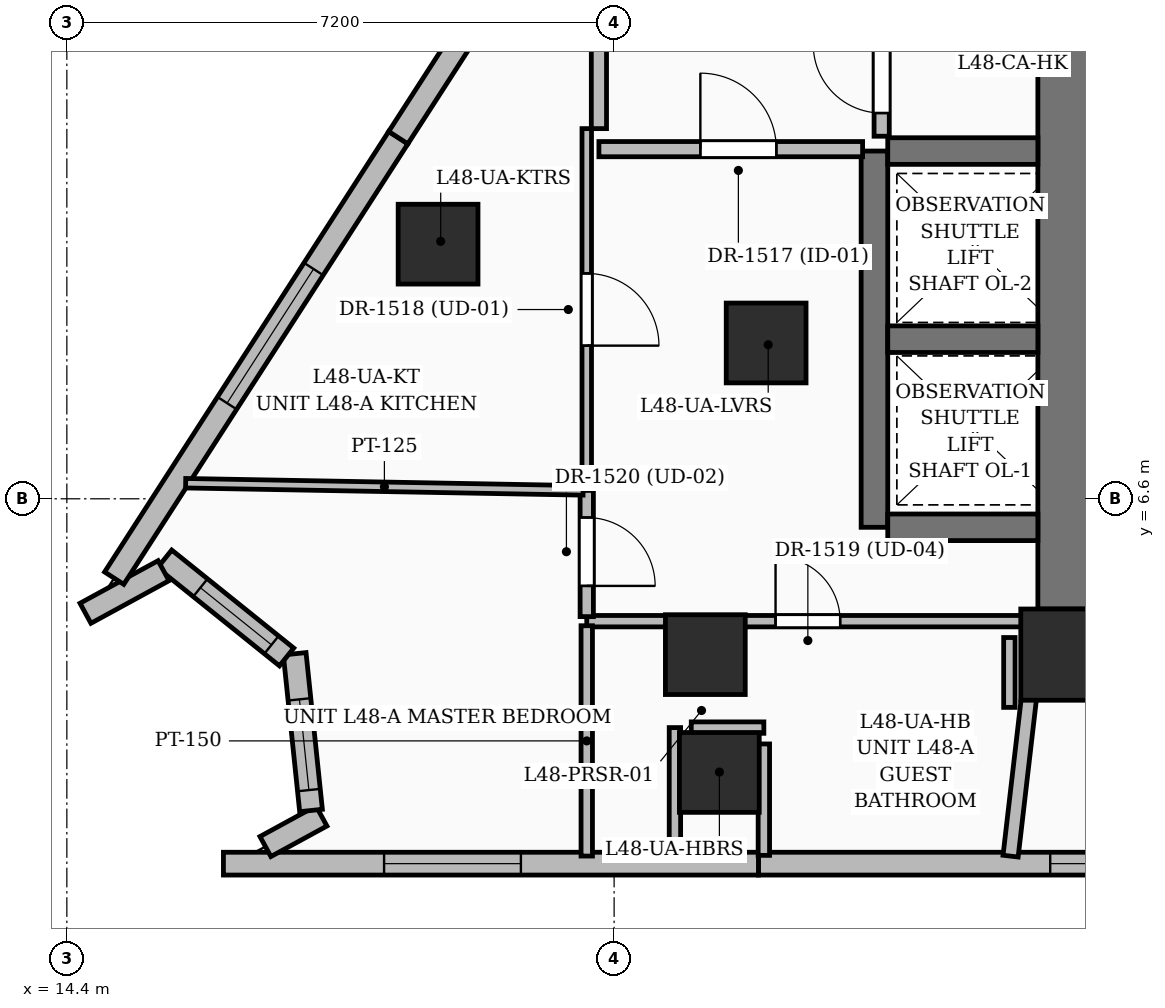
"""IFC4 building model, lengths in metres.
Left out: names, types, materials, properties, quantities, classifications, styles, units other than length and angle.
Written with IfcOpenShell. Run it as: python <this file> out.ifc"""

import sys

from ifc_helpers import new_model, si_unit, direction, frame, frame_2d, origin, origin_2d, place, context, subcontext, project, spatial, rectangle, extrude, element, fill, save


model = new_model("IFC4")
c1 = context("Model", 3, precision=1e-05, world=origin(), true_north=direction((0.0, 1.0)))
c2 = subcontext(c1, "Body", "Model", "MODEL_VIEW")
j1 = project(units=[si_unit("LENGTHUNIT", "METRE"), si_unit("PLANEANGLEUNIT", "RADIAN")], contexts=[c1])
p1 = place(None, origin())
s1 = spatial("IfcSite", under=j1, at=p1, CompositionType="ELEMENT")
p2 = place(p1, origin())
s2 = spatial("IfcBuilding", under=s1, at=p2, CompositionType="ELEMENT")
p3 = place(p2, frame((0.0, 0.0, 186.0)))
s3 = spatial("IfcBuildingStorey", under=s2, at=p3, CompositionType="ELEMENT", Elevation=186.0)
p4 = place(p3, frame((27.55, 4.55, 0.0), z_axis=(0.0, 0.0, 1.0), x_axis=(1.0, 0.0, 0.0)))
e1 = element("IfcColumn", 1, at=p4, inside=s3, PredefinedType="COLUMN", context=c2, shape_type="SweptSolid", body=[
    extrude(rectangle(XDim=1.2, YDim=1.2, at=origin_2d()), origin(), (0.0, 0.0, 1.0), 3.6),
])
for number, where, z_axis, x_axis in (
    (2, (22.8, 4.55, 0.0), (0.0, 0.0, 1.0), (1.0, 0.0, 0.0)),
    (3, (23.6, 8.65, 0.0), (0.0, 0.0, 1.0), (1.0, 0.0, 0.0)),
):
    element("IfcColumn", number, at=place(p3, frame(where, z_axis=z_axis, x_axis=x_axis)), inside=s3, PredefinedType="COLUMN", context=c2, shape_type="SweptSolid", body=[
        extrude(rectangle(XDim=1.05, YDim=1.05, at=origin_2d()), origin(), (0.0, 0.0, 1.0), 3.6),
    ])
p5 = place(p3, frame((27.55, 5.15, 0.0), z_axis=(0.0, 0.0, 1.0), x_axis=(0.0, 1.0, 0.0)))
e4 = element("IfcWall", 4, at=p5, inside=s3, PredefinedType="SHEAR", context=c2, shape_type="SweptSolid", body=[
    extrude(rectangle(XDim=9.0, YDim=0.75, at=frame_2d((4.5, 0.0))), origin(), (0.0, 0.0, 1.0), 3.6),
])
p6 = place(p3, frame((25.025, 6.225, 0.0), z_axis=(0.0, 0.0, 1.0), x_axis=(0.0, 1.0, 0.0)))
e5 = element("IfcWall", 5, at=p6, inside=s3, PredefinedType="SOLIDWALL", context=c2, shape_type="SweptSolid", body=[
    extrude(rectangle(XDim=4.95, YDim=0.35, at=frame_2d((2.475, 0.0))), origin(), (0.0, 0.0, 1.0), 3.6),
])
for number, where, z_axis, x_axis in (
    (6, (25.2, 6.225, 0.0), (0.0, 0.0, 1.0), (1.0, 0.0, 0.0)),
    (7, (25.2, 8.7, 0.0), (0.0, 0.0, 1.0), (1.0, 0.0, 0.0)),
    (8, (25.2, 11.175, 0.0), (0.0, 0.0, 1.0), (1.0, 0.0, 0.0)),
):
    element("IfcWall", number, at=place(p3, frame(where, z_axis=z_axis, x_axis=x_axis)), inside=s3, PredefinedType="SOLIDWALL", context=c2, shape_type="SweptSolid", body=[
        extrude(rectangle(XDim=1.975, YDim=0.35, at=frame_2d((0.988, 0.0))), origin(), (0.0, 0.0, 1.0), 3.6),
    ])
for number, where, z_axis, x_axis in (
    (9, (22.984, 3.0, 0.0), (0.0, 0.0, 1.0), (1.0, 0.0, 0.0)),
    (10, (19.284, 9.95, 0.0), (0.0, 0.0, 1.0), (1.0, 0.0, 0.0)),
):
    element("IfcColumn", number, at=place(p3, frame(where, z_axis=z_axis, x_axis=x_axis)), inside=s3, PredefinedType="COLUMN", context=c2, shape_type="SweptSolid", body=[
        extrude(rectangle(XDim=1.05, YDim=1.05, at=origin_2d()), origin(), (0.0, 0.0, 1.0), 3.6),
    ])
p7 = place(p3, frame((30.537, 1.8, 0.0), z_axis=(0.0, 0.0, 1.0), x_axis=(-1.0, 0.0, 0.0)))
e11 = element("IfcWall", 11, at=p7, inside=s3, PredefinedType="SOLIDWALL", context=c2, shape_type="SweptSolid", body=[
    extrude(rectangle(XDim=7.039, YDim=0.3, at=frame_2d((3.519, 0.0))), origin(), (0.0, 0.0, 1.0), 3.35),
])
p8 = place(p7, frame((1.1, 0.0, 0.55)))
e12 = element("IfcOpeningElement", 12, at=p8, cuts=e11, PredefinedType="OPENING", context=c2, shape_type="SweptSolid", body=[
    extrude(rectangle(XDim=2.1, YDim=2.4, at=frame_2d((1.05, 1.2))), frame((0.0, 0.16, 0.0), z_axis=(0.0, -1.0, 0.0), x_axis=(1.0, 0.0, 0.0)), (0.0, 0.0, 1.0), 0.32),
])
p9 = place(p3, frame((23.499, 1.8, 0.0), z_axis=(0.0, 0.0, 1.0), x_axis=(-1.0, 0.0, 0.0)))
e13 = element("IfcWall", 13, at=p9, inside=s3, PredefinedType="SOLIDWALL", context=c2, shape_type="SweptSolid", body=[
    extrude(rectangle(XDim=7.039, YDim=0.3, at=frame_2d((3.52, 0.0))), origin(), (0.0, 0.0, 1.0), 3.35),
])
p10 = place(p9, frame((3.125, 0.0, 0.6)))
e14 = element("IfcOpeningElement", 14, at=p10, cuts=e13, PredefinedType="OPENING", context=c2, shape_type="SweptSolid", body=[
    extrude(rectangle(XDim=1.8, YDim=2.1, at=frame_2d((0.9, 1.05))), frame((0.0, 0.16, 0.0), z_axis=(0.0, -1.0, 0.0), x_axis=(1.0, 0.0, 0.0)), (0.0, 0.0, 1.0), 0.32),
])
p11 = place(p3, frame((17.013, 2.025, 0.0), z_axis=(0.0, 0.0, 1.0), x_axis=(0.877928900016, 0.478791025936, 0.0)))
e15 = element("IfcWall", 15, at=p11, inside=s3, PredefinedType="SOLIDWALL", context=c2, shape_type="SweptSolid", body=[
    extrude(rectangle(XDim=0.84, YDim=0.3, at=frame_2d((0.42, 0.0))), origin(), (0.0, 0.0, 1.0), 3.35),
])
p12 = place(p3, frame((17.613, 2.499, 0.0), z_axis=(0.0, 0.0, 1.0), x_axis=(-0.10374684954, 0.994603735771, 0.0)))
e16 = element("IfcWall", 16, at=p12, inside=s3, PredefinedType="SOLIDWALL", context=c2, shape_type="SweptSolid", body=[
    extrude(rectangle(XDim=2.073, YDim=0.3, at=frame_2d((1.037, 0.0))), origin(), (0.0, 0.0, 1.0), 3.35),
])
p13 = place(p12, frame((0.27, 0.0, 0.8)))
e17 = element("IfcOpeningElement", 17, at=p13, cuts=e16, PredefinedType="OPENING", context=c2, shape_type="SweptSolid", body=[
    extrude(rectangle(XDim=1.2, YDim=1.8, at=frame_2d((0.6, 0.9))), frame((0.0, 0.16, 0.0), z_axis=(0.0, -1.0, 0.0), x_axis=(1.0, 0.0, 0.0)), (0.0, 0.0, 1.0), 0.32),
])
p14 = place(p3, frame((17.291, 4.519, 0.0), z_axis=(0.0, 0.0, 1.0), x_axis=(-0.779594735896, 0.626284318631, 0.0)))
e18 = element("IfcWall", 18, at=p14, inside=s3, PredefinedType="SOLIDWALL", context=c2, shape_type="SweptSolid", body=[
    extrude(rectangle(XDim=2.059, YDim=0.3, at=frame_2d((1.03, 0.0))), origin(), (0.0, 0.0, 1.0), 3.35),
])
p15 = place(p14, frame((0.255, 0.0, 0.8)))
e19 = element("IfcOpeningElement", 19, at=p15, cuts=e18, PredefinedType="OPENING", context=c2, shape_type="SweptSolid", body=[
    extrude(rectangle(XDim=1.2, YDim=1.8, at=frame_2d((0.6, 0.9))), frame((0.0, 0.16, 0.0), z_axis=(0.0, -1.0, 0.0), x_axis=(1.0, 0.0, 0.0)), (0.0, 0.0, 1.0), 0.32),
])
p16 = place(p3, frame((15.672, 5.654, 0.0), z_axis=(0.0, 0.0, 1.0), x_axis=(-0.877959368473, -0.478735153619, 0.0)))
e20 = element("IfcWall", 20, at=p16, inside=s3, PredefinedType="SOLIDWALL", context=c2, shape_type="SweptSolid", body=[
    extrude(rectangle(XDim=1.17, YDim=0.3, at=frame_2d((0.585, 0.0))), origin(), (0.0, 0.0, 1.0), 3.35),
])
p17 = place(p3, frame((15.023, 5.556, 0.0), z_axis=(0.0, 0.0, 1.0), x_axis=(0.542022034858, 0.840364274424, 0.0)))
e21 = element("IfcWall", 21, at=p17, inside=s3, PredefinedType="SOLIDWALL", context=c2, shape_type="SweptSolid", body=[
    extrude(rectangle(XDim=6.896, YDim=0.3, at=frame_2d((3.448, 0.0))), origin(), (0.0, 0.0, 1.0), 3.35),
])
p18 = place(p17, frame((2.74, 0.0, 0.55)))
e22 = element("IfcOpeningElement", 22, at=p18, cuts=e21, PredefinedType="OPENING", context=c2, shape_type="SweptSolid", body=[
    extrude(rectangle(XDim=2.1, YDim=2.4, at=frame_2d((1.05, 1.2))), frame((0.0, 0.16, 0.0), z_axis=(0.0, -1.0, 0.0), x_axis=(1.0, 0.0, 0.0)), (0.0, 0.0, 1.0), 0.32),
])
p19 = place(p3, frame((18.76, 11.351, 0.0), z_axis=(0.0, 0.0, 1.0), x_axis=(0.542021503454, 0.840364617172, 0.0)))
e23 = element("IfcWall", 23, at=p19, inside=s3, PredefinedType="SOLIDWALL", context=c2, shape_type="SweptSolid", body=[
    extrude(rectangle(XDim=7.231, YDim=0.3, at=frame_2d((3.615, 0.0))), origin(), (0.0, 0.0, 1.0), 3.35),
])
p20 = place(p19, frame((4.5, 0.0, 0.6)))
e24 = element("IfcOpeningElement", 24, at=p20, cuts=e23, PredefinedType="OPENING", context=c2, shape_type="SweptSolid", body=[
    extrude(rectangle(XDim=1.8, YDim=2.1, at=frame_2d((0.9, 1.05))), frame((0.0, 0.16, 0.0), z_axis=(0.0, -1.0, 0.0), x_axis=(1.0, 0.0, 0.0)), (0.0, 0.0, 1.0), 0.32),
])
p21 = place(p3, frame((25.12, 11.37, 0.0), z_axis=(0.0, 0.0, 1.0), x_axis=(0.0, 1.0, 0.0)))
e25 = element("IfcWall", 25, at=p21, inside=s3, PredefinedType="PARTITIONING", context=c2, shape_type="SweptSolid", body=[
    extrude(rectangle(XDim=1.74, YDim=0.2, at=frame_2d((0.87, 0.0))), origin(), (0.0, 0.0, 1.0), 3.35),
])
p22 = place(p21, frame((0.305, 0.0, 0.0)))
e26 = element("IfcOpeningElement", 26, at=p22, cuts=e25, PredefinedType="OPENING", context=c2, shape_type="SweptSolid", body=[
    extrude(rectangle(XDim=0.9, YDim=2.1, at=frame_2d((0.45, 1.05))), frame((0.0, 0.11, 0.0), z_axis=(0.0, -1.0, 0.0), x_axis=(1.0, 0.0, 0.0)), (0.0, 0.0, 1.0), 0.22),
])
p23 = place(p3, frame((21.4, 12.66, 0.0), z_axis=(0.0, 0.0, 1.0), x_axis=(0.0, -1.0, 0.0)))
e27 = element("IfcWall", 27, at=p23, inside=s3, PredefinedType="PARTITIONING", context=c2, shape_type="SweptSolid", body=[
    extrude(rectangle(XDim=1.19, YDim=0.2, at=frame_2d((0.595, 0.0))), origin(), (0.0, 0.0, 1.0), 3.35),
])
p24 = place(p3, frame((21.4, 11.2, 0.0), z_axis=(0.0, 0.0, 1.0), x_axis=(1.0, 0.0, 0.0)))
e28 = element("IfcWall", 28, at=p24, inside=s3, PredefinedType="PARTITIONING", context=c2, shape_type="SweptSolid", body=[
    extrude(rectangle(XDim=3.469, YDim=0.2, at=frame_2d((1.735, 0.0))), origin(), (0.0, 0.0, 1.0), 3.35),
])
p25 = place(p24, frame((1.335, 0.0, 0.0)))
e29 = element("IfcOpeningElement", 29, at=p25, cuts=e28, PredefinedType="OPENING", context=c2, shape_type="SweptSolid", body=[
    extrude(rectangle(XDim=1.0, YDim=2.2, at=frame_2d((0.5, 1.1))), frame((0.0, 0.11, 0.0), z_axis=(0.0, -1.0, 0.0), x_axis=(1.0, 0.0, 0.0)), (0.0, 0.0, 1.0), 0.22),
])
p26 = place(p3, frame((21.24, 4.99, 0.0), z_axis=(0.0, 0.0, 1.0), x_axis=(1.0, 0.0, 0.0)))
e30 = element("IfcWall", 30, at=p26, inside=s3, PredefinedType="PARTITIONING", context=c2, shape_type="SweptSolid", body=[
    extrude(rectangle(XDim=5.935, YDim=0.15, at=frame_2d((2.968, 0.0))), origin(), (0.0, 0.0, 1.0), 2.57),
])
p27 = place(p26, frame((2.484, 0.0, 0.0)))
e31 = element("IfcOpeningElement", 31, at=p27, cuts=e30, PredefinedType="OPENING", context=c2, shape_type="SweptSolid", body=[
    extrude(rectangle(XDim=0.85, YDim=2.1, at=frame_2d((0.425, 1.05))), frame((0.0, 0.085, 0.0), z_axis=(0.0, -1.0, 0.0), x_axis=(1.0, 0.0, 0.0)), (0.0, 0.0, 1.0), 0.17),
])
p28 = place(p3, frame((21.24, 11.47, 0.0), z_axis=(0.0, 0.0, 1.0), x_axis=(0.0, -1.0, 0.0)))
e32 = element("IfcWall", 32, at=p28, inside=s3, PredefinedType="PARTITIONING", context=c2, shape_type="SweptSolid", body=[
    extrude(rectangle(XDim=4.76, YDim=0.125, at=frame_2d((2.38, 0.0))), origin(), (0.0, 0.0, 1.0), 2.464),
])
p29 = place(p28, frame((1.905, 0.0, 0.0)))
e33 = element("IfcOpeningElement", 33, at=p29, cuts=e32, PredefinedType="OPENING", context=c2, shape_type="SweptSolid", body=[
    extrude(rectangle(XDim=0.95, YDim=2.2, at=frame_2d((0.475, 1.1))), frame((0.0, 0.072, 0.0), z_axis=(0.0, -1.0, 0.0), x_axis=(1.0, 0.0, 0.0)), (0.0, 0.0, 1.0), 0.145),
])
p30 = place(p3, frame((21.24, 6.71, 0.0), z_axis=(0.0, 0.0, 1.0), x_axis=(0.0, -1.0, 0.0)))
e34 = element("IfcWall", 34, at=p30, inside=s3, PredefinedType="PARTITIONING", context=c2, shape_type="SweptSolid", body=[
    extrude(rectangle(XDim=1.66, YDim=0.175, at=frame_2d((0.83, 0.0))), origin(), (0.0, 0.0, 1.0), 2.57),
])
p31 = place(p30, frame((0.356, 0.0, 0.0)))
e35 = element("IfcOpeningElement", 35, at=p31, cuts=e34, PredefinedType="OPENING", context=c2, shape_type="SweptSolid", body=[
    extrude(rectangle(XDim=0.9, YDim=2.15, at=frame_2d((0.45, 1.075))), frame((0.0, 0.097, 0.0), z_axis=(0.0, -1.0, 0.0), x_axis=(1.0, 0.0, 0.0)), (0.0, 0.0, 1.0), 0.195),
])
p32 = place(p3, frame((21.24, 4.93, 0.0), z_axis=(0.0, 0.0, 1.0), x_axis=(0.0, -1.0, 0.0)))
e36 = element("IfcWall", 36, at=p32, inside=s3, PredefinedType="PARTITIONING", context=c2, shape_type="SweptSolid", body=[
    extrude(rectangle(XDim=3.03, YDim=0.15, at=frame_2d((1.515, 0.0))), origin(), (0.0, 0.0, 1.0), 3.35),
])
p33 = place(p3, frame((26.816, 1.899, 0.0), z_axis=(0.0, 0.0, 1.0), x_axis=(0.115355846157, 0.993324231436, 0.0)))
e37 = element("IfcWall", 37, at=p33, inside=s3, PredefinedType="PARTITIONING", context=c2, shape_type="SweptSolid", body=[
    extrude(rectangle(XDim=3.052, YDim=0.2, at=frame_2d((1.526, 0.0))), origin(), (0.0, 0.0, 1.0), 2.57),
])
p34 = place(p3, frame((15.963, 6.805, 0.0), z_axis=(0.0, 0.0, 1.0), x_axis=(0.999837669576, -0.018017616268, 0.0)))
e38 = element("IfcWall", 38, at=p34, inside=s3, PredefinedType="PARTITIONING", context=c2, shape_type="SweptSolid", body=[
    extrude(rectangle(XDim=5.23, YDim=0.125, at=frame_2d((2.615, 0.0))), origin(), (0.0, 0.0, 1.0), 2.57),
])
p35 = place(p3, frame((22.76, 1.889, 0.0), z_axis=(0.0, 0.0, 1.0), x_axis=(0.0, 1.0, 0.0)))
e39 = element("IfcWall", 39, at=p35, inside=s3, PredefinedType="PARTITIONING", context=c2, shape_type="SweptSolid", body=[
    extrude(rectangle(XDim=0.02, YDim=0.15, at=frame_2d((0.01, 0.0))), origin(), (0.0, 0.0, 1.0), 3.35),
])
p36 = place(p3, frame((22.4, 1.909, 0.0), z_axis=(0.0, 0.0, 1.0), x_axis=(0.0, 1.0, 0.0)))
e40 = element("IfcWall", 40, at=p36, inside=s3, PredefinedType="PARTITIONING", context=c2, shape_type="SweptSolid", body=[
    extrude(rectangle(XDim=1.681, YDim=0.15, at=frame_2d((0.841, 0.0))), origin(), (0.0, 0.0, 1.0), 2.57),
])
p37 = place(p3, frame((22.615, 3.59, 0.0), z_axis=(0.0, 0.0, 1.0), x_axis=(1.0, 0.0, 0.0)))
e41 = element("IfcWall", 41, at=p37, inside=s3, PredefinedType="PARTITIONING", context=c2, shape_type="SweptSolid", body=[
    extrude(rectangle(XDim=0.955, YDim=0.15, at=frame_2d((0.478, 0.0))), origin(), (0.0, 0.0, 1.0), 2.57),
])
p38 = place(p3, frame((23.57, 3.375, 0.0), z_axis=(0.0, 0.0, 1.0), x_axis=(0.0, -1.0, 0.0)))
e42 = element("IfcWall", 42, at=p38, inside=s3, PredefinedType="PARTITIONING", context=c2, shape_type="SweptSolid", body=[
    extrude(rectangle(XDim=1.466, YDim=0.15, at=frame_2d((0.733, 0.0))), origin(), (0.0, 0.0, 1.0), 2.57),
])
p39 = place(p3, frame((23.2, 1.909, 0.0), z_axis=(0.0, 0.0, 1.0), x_axis=(0.0, -1.0, 0.0)))
e43 = element("IfcWall", 43, at=p39, inside=s3, PredefinedType="PARTITIONING", context=c2, shape_type="SweptSolid", body=[
    extrude(rectangle(XDim=0.02, YDim=0.15, at=frame_2d((0.01, 0.0))), origin(), (0.0, 0.0, 1.0), 3.35),
])
p40 = place(p3, frame((26.8, 3.856, 0.0), z_axis=(0.0, 0.0, 1.0), x_axis=(0.0, 1.0, 0.0)))
e44 = element("IfcWall", 44, at=p40, inside=s3, PredefinedType="PARTITIONING", context=c2, shape_type="SweptSolid", body=[
    extrude(rectangle(XDim=0.919, YDim=0.15, at=frame_2d((0.459, 0.0))), origin(), (0.0, 0.0, 1.0), 2.436),
])
p41 = place(p8, origin())
e45 = element("IfcWindow", 45, at=p41, inside=s3, PartitioningType="SINGLE_PANEL", PredefinedType="WINDOW", context=c2, shape_type="SweptSolid", body=[
    extrude(rectangle(XDim=2.1, YDim=2.4, at=frame_2d((1.05, 1.2))), frame((0.0, 0.03, 0.0), z_axis=(0.0, -1.0, 0.0), x_axis=(1.0, 0.0, 0.0)), (0.0, 0.0, 1.0), 0.06),
])
fill(e12, e45)
p42 = place(p10, origin())
e46 = element("IfcWindow", 46, at=p42, inside=s3, PartitioningType="SINGLE_PANEL", PredefinedType="WINDOW", context=c2, shape_type="SweptSolid", body=[
    extrude(rectangle(XDim=1.8, YDim=2.1, at=frame_2d((0.9, 1.05))), frame((0.0, 0.03, 0.0), z_axis=(0.0, -1.0, 0.0), x_axis=(1.0, 0.0, 0.0)), (0.0, 0.0, 1.0), 0.06),
])
fill(e14, e46)
p43 = place(p13, origin())
e47 = element("IfcWindow", 47, at=p43, inside=s3, PartitioningType="SINGLE_PANEL", PredefinedType="WINDOW", context=c2, shape_type="SweptSolid", body=[
    extrude(rectangle(XDim=1.2, YDim=1.8, at=frame_2d((0.6, 0.9))), frame((0.0, 0.03, 0.0), z_axis=(0.0, -1.0, 0.0), x_axis=(1.0, 0.0, 0.0)), (0.0, 0.0, 1.0), 0.06),
])
fill(e17, e47)
p44 = place(p15, origin())
e48 = element("IfcWindow", 48, at=p44, inside=s3, PartitioningType="SINGLE_PANEL", PredefinedType="WINDOW", context=c2, shape_type="SweptSolid", body=[
    extrude(rectangle(XDim=1.2, YDim=1.8, at=frame_2d((0.6, 0.9))), frame((0.0, 0.03, 0.0), z_axis=(0.0, -1.0, 0.0), x_axis=(1.0, 0.0, 0.0)), (0.0, 0.0, 1.0), 0.06),
])
fill(e19, e48)
p45 = place(p18, origin())
e49 = element("IfcWindow", 49, at=p45, inside=s3, PartitioningType="SINGLE_PANEL", PredefinedType="WINDOW", context=c2, shape_type="SweptSolid", body=[
    extrude(rectangle(XDim=2.1, YDim=2.4, at=frame_2d((1.05, 1.2))), frame((0.0, 0.03, 0.0), z_axis=(0.0, -1.0, 0.0), x_axis=(1.0, 0.0, 0.0)), (0.0, 0.0, 1.0), 0.06),
])
fill(e22, e49)
p46 = place(p22, origin())
e50 = element("IfcDoor", 50, at=p46, inside=s3, OperationType="SINGLE_SWING_RIGHT", PredefinedType="DOOR", context=c2, shape_type="SweptSolid", body=[
    extrude(rectangle(XDim=0.9, YDim=2.1, at=frame_2d((0.45, 1.05))), frame((0.0, 0.025, 0.0), z_axis=(0.0, -1.0, 0.0), x_axis=(1.0, 0.0, 0.0)), (0.0, 0.0, 1.0), 0.05),
])
fill(e26, e50)
p47 = place(p25, origin())
e51 = element("IfcDoor", 51, at=p47, inside=s3, OperationType="SINGLE_SWING_LEFT", PredefinedType="DOOR", context=c2, shape_type="SweptSolid", body=[
    extrude(rectangle(XDim=1.0, YDim=2.2, at=frame_2d((0.5, 1.1))), frame((0.0, 0.025, 0.0), z_axis=(0.0, -1.0, 0.0), x_axis=(1.0, 0.0, 0.0)), (0.0, 0.0, 1.0), 0.05),
])
fill(e29, e51)
p48 = place(p29, origin())
e52 = element("IfcDoor", 52, at=p48, inside=s3, OperationType="SINGLE_SWING_RIGHT", PredefinedType="DOOR", context=c2, shape_type="SweptSolid", body=[
    extrude(rectangle(XDim=0.95, YDim=2.2, at=frame_2d((0.475, 1.1))), frame((0.0, 0.025, 0.0), z_axis=(0.0, -1.0, 0.0), x_axis=(1.0, 0.0, 0.0)), (0.0, 0.0, 1.0), 0.05),
])
fill(e33, e52)
p49 = place(p27, origin())
e53 = element("IfcDoor", 53, at=p49, inside=s3, OperationType="SINGLE_SWING_LEFT", PredefinedType="DOOR", context=c2, shape_type="SweptSolid", body=[
    extrude(rectangle(XDim=0.85, YDim=2.1, at=frame_2d((0.425, 1.05))), frame((0.0, 0.025, 0.0), z_axis=(0.0, -1.0, 0.0), x_axis=(1.0, 0.0, 0.0)), (0.0, 0.0, 1.0), 0.05),
])
fill(e31, e53)
p50 = place(p31, origin())
e54 = element("IfcDoor", 54, at=p50, inside=s3, OperationType="SINGLE_SWING_RIGHT", PredefinedType="DOOR", context=c2, shape_type="SweptSolid", body=[
    extrude(rectangle(XDim=0.9, YDim=2.15, at=frame_2d((0.45, 1.075))), frame((0.0, 0.025, 0.0), z_axis=(0.0, -1.0, 0.0), x_axis=(1.0, 0.0, 0.0)), (0.0, 0.0, 1.0), 0.05),
])
fill(e35, e54)
save(model, sys.argv[1])
